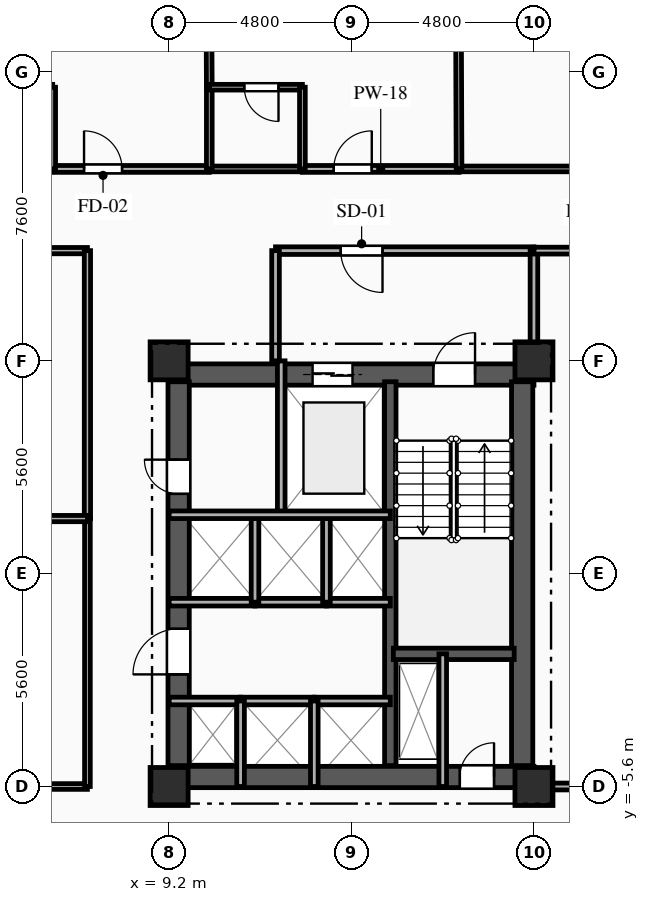
"""IFC4 building model, lengths in metres.
Left out: names, types, materials, properties, quantities, classifications, styles, units other than length and angle.
Written with IfcOpenShell. Run it as: python <this file> out.ifc"""

import sys

from ifc_helpers import new_model, si_unit, direction, frame, frame_2d, origin, origin_2d, place, context, subcontext, project, spatial, rectangle, extrude, element, fill, save


model = new_model("IFC4")
c1 = context("Model", 3, precision=1e-05, world=origin(), true_north=direction((0.0, 1.0)))
c2 = subcontext(c1, "Body", "Model", "MODEL_VIEW")
j1 = project(units=[si_unit("LENGTHUNIT", "METRE"), si_unit("PLANEANGLEUNIT", "RADIAN")], contexts=[c1])
p1 = place(None, origin())
s1 = spatial("IfcSite", under=j1, at=p1, CompositionType="ELEMENT")
p2 = place(p1, origin())
s2 = spatial("IfcBuilding", under=s1, at=p2, CompositionType="ELEMENT")
p3 = place(p2, frame((0.0, 0.0, 85.7)))
s3 = spatial("IfcBuildingStorey", under=s2, at=p3, CompositionType="ELEMENT", Elevation=85.7)
for number, where, z_axis, x_axis in (
    (1, (9.2, -5.6, 0.0), (0.0, 0.0, 1.0), (1.0, 0.0, 0.0)),
    (2, (9.2, 5.6, 0.0), (0.0, 0.0, 1.0), (1.0, 0.0, 0.0)),
    (3, (18.8, -5.6, 0.0), (0.0, 0.0, 1.0), (1.0, 0.0, 0.0)),
    (4, (18.8, 5.6, 0.0), (0.0, 0.0, 1.0), (1.0, 0.0, 0.0)),
):
    element("IfcColumn", number, at=place(p3, frame(where, z_axis=z_axis, x_axis=x_axis)), inside=s3, PredefinedType="COLUMN", context=c2, shape_type="SweptSolid", body=[
        extrude(rectangle(XDim=1.0, YDim=1.0, at=origin_2d()), origin(), (0.0, 0.0, 1.0), 3.35),
    ])
p4 = place(p3, frame((9.2, 5.24, 0.0), z_axis=(0.0, 0.0, 1.0), x_axis=(1.0, 0.0, 0.0)))
e5 = element("IfcWall", 5, at=p4, inside=s3, PredefinedType="SHEAR", context=c2, shape_type="SweptSolid", body=[
    extrude(rectangle(XDim=9.6, YDim=0.56, at=frame_2d((4.8, 0.0))), origin(), (0.0, 0.0, 1.0), 3.045),
])
p5 = place(p4, frame((6.95, 0.0, 0.0)))
e6 = element("IfcOpeningElement", 6, at=p5, cuts=e5, PredefinedType="OPENING", context=c2, shape_type="SweptSolid", body=[
    extrude(rectangle(XDim=1.1, YDim=2.15, at=frame_2d((0.55, 1.075))), frame((0.0, 0.29, 0.0), z_axis=(0.0, -1.0, 0.0), x_axis=(1.0, 0.0, 0.0)), (0.0, 0.0, 1.0), 0.58),
])
p6 = place(p4, frame((3.775, 0.0, 0.0)))
e7 = element("IfcOpeningElement", 7, at=p6, cuts=e5, PredefinedType="OPENING", context=c2, shape_type="SweptSolid", body=[
    extrude(rectangle(XDim=1.05, YDim=2.1, at=frame_2d((0.525, 1.05))), frame((0.0, 0.29, 0.0), z_axis=(0.0, -1.0, 0.0), x_axis=(1.0, 0.0, 0.0)), (0.0, 0.0, 1.0), 0.58),
])
p7 = place(p3, frame((9.2, -5.35, 0.0), z_axis=(0.0, 0.0, 1.0), x_axis=(1.0, 0.0, 0.0)))
e8 = element("IfcWall", 8, at=p7, inside=s3, PredefinedType="SHEAR", context=c2, shape_type="SweptSolid", body=[
    extrude(rectangle(XDim=9.6, YDim=0.56, at=frame_2d((4.8, 0.0))), origin(), (0.0, 0.0, 1.0), 3.045),
])
p8 = place(p7, frame((7.65, 0.0, 0.0)))
e9 = element("IfcOpeningElement", 9, at=p8, cuts=e8, PredefinedType="OPENING", context=c2, shape_type="SweptSolid", body=[
    extrude(rectangle(XDim=0.9, YDim=2.1, at=frame_2d((0.45, 1.05))), frame((0.0, 0.29, 0.0), z_axis=(0.0, -1.0, 0.0), x_axis=(1.0, 0.0, 0.0)), (0.0, 0.0, 1.0), 0.58),
])
p9 = place(p3, frame((9.45, -5.05, 0.0), z_axis=(0.0, 0.0, 1.0), x_axis=(0.0, 1.0, 0.0)))
e10 = element("IfcWall", 10, at=p9, inside=s3, PredefinedType="SHEAR", context=c2, shape_type="SweptSolid", body=[
    extrude(rectangle(XDim=10.1, YDim=0.56, at=frame_2d((5.05, 0.0))), origin(), (0.0, 0.0, 1.0), 3.045),
])
p10 = place(p9, frame((7.15, 0.0, 0.0)))
e11 = element("IfcOpeningElement", 11, at=p10, cuts=e10, PredefinedType="OPENING", context=c2, shape_type="SweptSolid", body=[
    extrude(rectangle(XDim=0.9, YDim=2.1, at=frame_2d((0.45, 1.05))), frame((0.0, 0.29, 0.0), z_axis=(0.0, -1.0, 0.0), x_axis=(1.0, 0.0, 0.0)), (0.0, 0.0, 1.0), 0.58),
])
p11 = place(p9, frame((2.4, 0.0, 0.0)))
e12 = element("IfcOpeningElement", 12, at=p11, cuts=e10, PredefinedType="OPENING", context=c2, shape_type="SweptSolid", body=[
    extrude(rectangle(XDim=1.2, YDim=2.15, at=frame_2d((0.6, 1.075))), frame((0.0, 0.29, 0.0), z_axis=(0.0, -1.0, 0.0), x_axis=(1.0, 0.0, 0.0)), (0.0, 0.0, 1.0), 0.58),
])
p12 = place(p3, frame((18.49, -5.05, 0.0), z_axis=(0.0, 0.0, 1.0), x_axis=(0.0, 1.0, 0.0)))
e13 = element("IfcWall", 13, at=p12, inside=s3, PredefinedType="SHEAR", context=c2, shape_type="SweptSolid", body=[
    extrude(rectangle(XDim=10.1, YDim=0.56, at=frame_2d((5.05, 0.0))), origin(), (0.0, 0.0, 1.0), 3.045),
])
p13 = place(p3, frame((15.02, -5.05, 0.0), z_axis=(0.0, 0.0, 1.0), x_axis=(0.0, 1.0, 0.0)))
e14 = element("IfcWall", 14, at=p13, inside=s3, PredefinedType="SHEAR", context=c2, shape_type="SweptSolid", body=[
    extrude(rectangle(XDim=10.1, YDim=0.3, at=frame_2d((5.05, 0.0))), origin(), (0.0, 0.0, 1.0), 3.045),
])
p14 = place(p3, frame((15.1, -2.11, 0.0), z_axis=(0.0, 0.0, 1.0), x_axis=(1.0, 0.0, 0.0)))
e15 = element("IfcWall", 15, at=p14, inside=s3, PredefinedType="SHEAR", context=c2, shape_type="SweptSolid", body=[
    extrude(rectangle(XDim=3.18, YDim=0.3, at=frame_2d((1.59, 0.0))), origin(), (0.0, 0.0, 1.0), 3.045),
])
p15 = place(p3, frame((16.4, -2.11, 0.0), z_axis=(0.0, 0.0, 1.0), x_axis=(0.0, -1.0, 0.0)))
e16 = element("IfcWall", 16, at=p15, inside=s3, PredefinedType="PARTITIONING", context=c2, shape_type="SweptSolid", body=[
    extrude(rectangle(XDim=3.49, YDim=0.2, at=frame_2d((1.745, 0.0))), origin(), (0.0, 0.0, 1.0), 3.045),
])
p16 = place(p3, frame((12.15, 5.6, 0.0), z_axis=(0.0, 0.0, 1.0), x_axis=(0.0, -1.0, 0.0)))
e17 = element("IfcWall", 17, at=p16, inside=s3, PredefinedType="PARTITIONING", context=c2, shape_type="SweptSolid", body=[
    extrude(rectangle(XDim=4.05, YDim=0.2, at=frame_2d((2.025, 0.0))), origin(), (0.0, 0.0, 1.0), 3.045),
])
p17 = place(p3, frame((18.8, 8.5, 0.0), z_axis=(0.0, 0.0, 1.0), x_axis=(-1.0, 0.0, 0.0)))
e18 = element("IfcWall", 18, at=p17, inside=s3, PredefinedType="PARTITIONING", context=c2, shape_type="SweptSolid", body=[
    extrude(rectangle(XDim=6.8, YDim=0.2, at=frame_2d((3.4, 0.0))), origin(), (0.0, 0.0, 1.0), 3.045),
])
p18 = place(p17, frame((3.985, 0.0, 0.0)))
e19 = element("IfcOpeningElement", 19, at=p18, cuts=e18, PredefinedType="OPENING", context=c2, shape_type="SweptSolid", body=[
    extrude(rectangle(XDim=1.1, YDim=2.15, at=frame_2d((0.55, 1.075))), frame((0.0, 0.11, 0.0), z_axis=(0.0, -1.0, 0.0), x_axis=(1.0, 0.0, 0.0)), (0.0, 0.0, 1.0), 0.22),
])
p19 = place(p3, frame((12.0, 8.5, 0.0), z_axis=(0.0, 0.0, 1.0), x_axis=(0.0, -1.0, 0.0)))
e20 = element("IfcWall", 20, at=p19, inside=s3, PredefinedType="PARTITIONING", context=c2, shape_type="SweptSolid", body=[
    extrude(rectangle(XDim=2.9, YDim=0.2, at=frame_2d((1.45, 0.0))), origin(), (0.0, 0.0, 1.0), 3.045),
])
p20 = place(p3, frame((18.8, 5.6, 0.0), z_axis=(0.0, 0.0, 1.0), x_axis=(0.0, 1.0, 0.0)))
e21 = element("IfcWall", 21, at=p20, inside=s3, PredefinedType="PARTITIONING", context=c2, shape_type="SweptSolid", body=[
    extrude(rectangle(XDim=2.9, YDim=0.2, at=frame_2d((1.45, 0.0))), origin(), (0.0, 0.0, 1.0), 2.53),
])
p21 = place(p3, frame((9.2, -3.35, 0.0), z_axis=(0.0, 0.0, 1.0), x_axis=(1.0, 0.0, 0.0)))
e22 = element("IfcWall", 22, at=p21, inside=s3, PredefinedType="PARTITIONING", context=c2, shape_type="SweptSolid", body=[
    extrude(rectangle(XDim=1.88, YDim=0.2, at=frame_2d((0.94, 0.0))), origin(), (0.0, 0.0, 1.0), 2.76),
])
p22 = place(p3, frame((11.08, -3.35, 0.0), z_axis=(0.0, 0.0, 1.0), x_axis=(1.0, 0.0, 0.0)))
e23 = element("IfcWall", 23, at=p22, inside=s3, PredefinedType="PARTITIONING", context=c2, shape_type="SweptSolid", body=[
    extrude(rectangle(XDim=1.94, YDim=0.2, at=frame_2d((0.97, 0.0))), origin(), (0.0, 0.0, 1.0), 3.045),
])
p23 = place(p3, frame((13.02, -3.35, 0.0), z_axis=(0.0, 0.0, 1.0), x_axis=(1.0, 0.0, 0.0)))
e24 = element("IfcWall", 24, at=p23, inside=s3, PredefinedType="PARTITIONING", context=c2, shape_type="SweptSolid", body=[
    extrude(rectangle(XDim=2.0, YDim=0.2, at=frame_2d((1.0, 0.0))), origin(), (0.0, 0.0, 1.0), 3.045),
])
p24 = place(p3, frame((11.46, -0.75, 0.0), z_axis=(0.0, 0.0, 1.0), x_axis=(-1.0, 0.0, 0.0)))
e25 = element("IfcWall", 25, at=p24, inside=s3, PredefinedType="PARTITIONING", context=c2, shape_type="SweptSolid", body=[
    extrude(rectangle(XDim=2.26, YDim=0.2, at=frame_2d((1.13, 0.0))), origin(), (0.0, 0.0, 1.0), 3.045),
])
p25 = place(p3, frame((13.34, -0.75, 0.0), z_axis=(0.0, 0.0, 1.0), x_axis=(-1.0, 0.0, 0.0)))
e26 = element("IfcWall", 26, at=p25, inside=s3, PredefinedType="PARTITIONING", context=c2, shape_type="SweptSolid", body=[
    extrude(rectangle(XDim=1.88, YDim=0.2, at=frame_2d((0.94, 0.0))), origin(), (0.0, 0.0, 1.0), 3.045),
])
p26 = place(p3, frame((15.02, -0.75, 0.0), z_axis=(0.0, 0.0, 1.0), x_axis=(-1.0, 0.0, 0.0)))
e27 = element("IfcWall", 27, at=p26, inside=s3, PredefinedType="PARTITIONING", context=c2, shape_type="SweptSolid", body=[
    extrude(rectangle(XDim=1.68, YDim=0.2, at=frame_2d((0.84, 0.0))), origin(), (0.0, 0.0, 1.0), 3.045),
])
for number, where, z_axis, x_axis in (
    (28, (11.08, -5.6, 0.0), (0.0, 0.0, 1.0), (0.0, 1.0, 0.0)),
    (29, (13.02, -5.6, 0.0), (0.0, 0.0, 1.0), (0.0, 1.0, 0.0)),
):
    element("IfcWall", number, at=place(p3, frame(where, z_axis=z_axis, x_axis=x_axis)), inside=s3, PredefinedType="PARTITIONING", context=c2, shape_type="SweptSolid", body=[
        extrude(rectangle(XDim=2.25, YDim=0.2, at=frame_2d((1.125, 0.0))), origin(), (0.0, 0.0, 1.0), 3.045),
    ])
for number, where, z_axis, x_axis in (
    (30, (11.46, -0.75, 0.0), (0.0, 0.0, 1.0), (0.0, 1.0, 0.0)),
    (31, (13.34, -0.75, 0.0), (0.0, 0.0, 1.0), (0.0, 1.0, 0.0)),
):
    element("IfcWall", number, at=place(p3, frame(where, z_axis=z_axis, x_axis=x_axis)), inside=s3, PredefinedType="PARTITIONING", context=c2, shape_type="SweptSolid", body=[
        extrude(rectangle(XDim=2.3, YDim=0.2, at=frame_2d((1.15, 0.0))), origin(), (0.0, 0.0, 1.0), 3.045),
    ])
p27 = place(p3, frame((21.45, 8.5, 0.0), z_axis=(0.0, 0.0, 1.0), x_axis=(-1.0, 0.0, 0.0)))
e32 = element("IfcWall", 32, at=p27, inside=s3, PredefinedType="PARTITIONING", context=c2, shape_type="SweptSolid", body=[
    extrude(rectangle(XDim=2.65, YDim=0.18, at=frame_2d((1.325, 0.0))), origin(), (0.0, 0.0, 1.0), 3.045),
])
p28 = place(p27, frame((0.641, 0.0, 0.0)))
e33 = element("IfcOpeningElement", 33, at=p28, cuts=e32, PredefinedType="OPENING", context=c2, shape_type="SweptSolid", body=[
    extrude(rectangle(XDim=1.0, YDim=2.15, at=frame_2d((0.5, 1.075))), frame((0.0, 0.1, 0.0), z_axis=(0.0, -1.0, 0.0), x_axis=(1.0, 0.0, 0.0)), (0.0, 0.0, 1.0), 0.2),
])
p29 = place(p3, frame((6.136, 10.65, 0.0), z_axis=(0.0, 0.0, 1.0), x_axis=(1.0, 0.0, 0.0)))
e34 = element("IfcWall", 34, at=p29, inside=s3, PredefinedType="PARTITIONING", context=c2, shape_type="SweptSolid", body=[
    extrude(rectangle(XDim=4.121, YDim=0.18, at=frame_2d((2.061, 0.0))), origin(), (0.0, 0.0, 1.0), 3.045),
])
p30 = place(p29, frame((0.825, 0.0, 0.0)))
e35 = element("IfcOpeningElement", 35, at=p30, cuts=e34, PredefinedType="OPENING", context=c2, shape_type="SweptSolid", body=[
    extrude(rectangle(XDim=1.0, YDim=2.15, at=frame_2d((0.5, 1.075))), frame((0.0, 0.1, 0.0), z_axis=(0.0, -1.0, 0.0), x_axis=(1.0, 0.0, 0.0)), (0.0, 0.0, 1.0), 0.2),
])
p31 = place(p3, frame((3.686, 10.65, 0.0), z_axis=(0.0, 0.0, 1.0), x_axis=(1.0, 0.0, 0.0)))
e36 = element("IfcWall", 36, at=p31, inside=s3, PredefinedType="PLUMBINGWALL", context=c2, shape_type="SweptSolid", body=[
    extrude(rectangle(XDim=2.45, YDim=0.15, at=frame_2d((1.225, 0.0))), origin(), (0.0, 0.0, 1.0), 3.045),
])
p32 = place(p3, frame((12.707, 10.65, 0.0), z_axis=(0.0, 0.0, 1.0), x_axis=(1.0, 0.0, 0.0)))
e37 = element("IfcWall", 37, at=p32, inside=s3, PredefinedType="PARTITIONING", context=c2, shape_type="SweptSolid", body=[
    extrude(rectangle(XDim=4.122, YDim=0.18, at=frame_2d((2.061, 0.0))), origin(), (0.0, 0.0, 1.0), 3.045),
])
p33 = place(p32, frame((0.825, 0.0, 0.0)))
e38 = element("IfcOpeningElement", 38, at=p33, cuts=e37, PredefinedType="OPENING", context=c2, shape_type="SweptSolid", body=[
    extrude(rectangle(XDim=1.0, YDim=2.15, at=frame_2d((0.5, 1.075))), frame((0.0, 0.1, 0.0), z_axis=(0.0, -1.0, 0.0), x_axis=(1.0, 0.0, 0.0)), (0.0, 0.0, 1.0), 0.2),
])
p34 = place(p3, frame((10.257, 10.65, 0.0), z_axis=(0.0, 0.0, 1.0), x_axis=(1.0, 0.0, 0.0)))
e39 = element("IfcWall", 39, at=p34, inside=s3, PredefinedType="PLUMBINGWALL", context=c2, shape_type="SweptSolid", body=[
    extrude(rectangle(XDim=2.45, YDim=0.15, at=frame_2d((1.225, 0.0))), origin(), (0.0, 0.0, 1.0), 3.045),
])
p35 = place(p3, frame((16.829, 10.65, 0.0), z_axis=(0.0, 0.0, 1.0), x_axis=(1.0, 0.0, 0.0)))
e40 = element("IfcWall", 40, at=p35, inside=s3, PredefinedType="PARTITIONING", context=c2, shape_type="SweptSolid", body=[
    extrude(rectangle(XDim=6.171, YDim=0.15, at=frame_2d((3.085, 0.0))), origin(), (0.0, 0.0, 1.0), 3.045),
])
p36 = place(p35, frame((4.046, 0.0, 0.0)))
e41 = element("IfcOpeningElement", 41, at=p36, cuts=e40, PredefinedType="OPENING", context=c2, shape_type="SweptSolid", body=[
    extrude(rectangle(XDim=1.05, YDim=2.15, at=frame_2d((0.525, 1.075))), frame((0.0, 0.085, 0.0), z_axis=(0.0, -1.0, 0.0), x_axis=(1.0, 0.0, 0.0)), (0.0, 0.0, 1.0), 0.17),
])
p37 = place(p3, frame((7.05, 8.5, 0.0), z_axis=(0.0, 0.0, 1.0), x_axis=(-1.0, 0.0, 0.0)))
e42 = element("IfcWall", 42, at=p37, inside=s3, PredefinedType="PARTITIONING", context=c2, shape_type="SweptSolid", body=[
    extrude(rectangle(XDim=7.05, YDim=0.165, at=frame_2d((3.525, 0.0))), origin(), (0.0, 0.0, 1.0), 3.045),
])
p38 = place(p37, frame((4.728, 0.0, 0.0)))
e43 = element("IfcOpeningElement", 43, at=p38, cuts=e42, PredefinedType="OPENING", context=c2, shape_type="SweptSolid", body=[
    extrude(rectangle(XDim=1.15, YDim=2.15, at=frame_2d((0.575, 1.075))), frame((0.0, 0.093, 0.0), z_axis=(0.0, -1.0, 0.0), x_axis=(1.0, 0.0, 0.0)), (0.0, 0.0, 1.0), 0.185),
])
p39 = place(p3, frame((18.8, -5.6, 0.0), z_axis=(0.0, 0.0, 1.0), x_axis=(1.0, 0.0, 0.0)))
e44 = element("IfcWall", 44, at=p39, inside=s3, PredefinedType="PARTITIONING", context=c2, shape_type="SweptSolid", body=[
    extrude(rectangle(XDim=2.65, YDim=0.18, at=frame_2d((1.325, 0.0))), origin(), (0.0, 0.0, 1.0), 2.53),
])
p40 = place(p3, frame((0.0, -5.6, 0.0), z_axis=(0.0, 0.0, 1.0), x_axis=(1.0, 0.0, 0.0)))
e45 = element("IfcWall", 45, at=p40, inside=s3, PredefinedType="PARTITIONING", context=c2, shape_type="SweptSolid", body=[
    extrude(rectangle(XDim=7.05, YDim=0.15, at=frame_2d((3.525, 0.0))), origin(), (0.0, 0.0, 1.0), 2.53),
])
p41 = place(p40, frame((1.185, 0.0, 0.0)))
e46 = element("IfcOpeningElement", 46, at=p41, cuts=e45, PredefinedType="OPENING", context=c2, shape_type="SweptSolid", body=[
    extrude(rectangle(XDim=1.05, YDim=2.15, at=frame_2d((0.525, 1.075))), frame((0.0, 0.085, 0.0), z_axis=(0.0, -1.0, 0.0), x_axis=(1.0, 0.0, 0.0)), (0.0, 0.0, 1.0), 0.17),
])
p42 = place(p3, frame((7.05, -5.6, 0.0), z_axis=(0.0, 0.0, 1.0), x_axis=(0.0, 1.0, 0.0)))
e47 = element("IfcWall", 47, at=p42, inside=s3, PredefinedType="PARTITIONING", context=c2, shape_type="SweptSolid", body=[
    extrude(rectangle(XDim=7.05, YDim=0.15, at=frame_2d((3.525, 0.0))), origin(), (0.0, 0.0, 1.0), 3.045),
])
p43 = place(p3, frame((7.05, 1.45, 0.0), z_axis=(0.0, 0.0, 1.0), x_axis=(0.0, 1.0, 0.0)))
e48 = element("IfcWall", 48, at=p43, inside=s3, PredefinedType="PARTITIONING", context=c2, shape_type="SweptSolid", body=[
    extrude(rectangle(XDim=7.05, YDim=0.165, at=frame_2d((3.525, 0.0))), origin(), (0.0, 0.0, 1.0), 3.045),
])
p44 = place(p3, frame((6.136, 12.8, 0.0), z_axis=(0.0, 0.0, 1.0), x_axis=(-1.0, 0.0, 0.0)))
e49 = element("IfcWall", 49, at=p44, inside=s3, PredefinedType="PLUMBINGWALL", context=c2, shape_type="SweptSolid", body=[
    extrude(rectangle(XDim=2.45, YDim=0.15, at=frame_2d((1.225, 0.0))), origin(), (0.0, 0.0, 1.0), 3.045),
])
p45 = place(p44, frame((0.921, 0.0, 0.0)))
e50 = element("IfcOpeningElement", 50, at=p45, cuts=e49, PredefinedType="OPENING", context=c2, shape_type="SweptSolid", body=[
    extrude(rectangle(XDim=0.9, YDim=2.1, at=frame_2d((0.45, 1.05))), frame((0.0, 0.085, 0.0), z_axis=(0.0, -1.0, 0.0), x_axis=(1.0, 0.0, 0.0)), (0.0, 0.0, 1.0), 0.17),
])
p46 = place(p3, frame((6.136, 10.65, 0.0), z_axis=(0.0, 0.0, 1.0), x_axis=(0.0, 1.0, 0.0)))
e51 = element("IfcWall", 51, at=p46, inside=s3, PredefinedType="PLUMBINGWALL", context=c2, shape_type="SweptSolid", body=[
    extrude(rectangle(XDim=2.15, YDim=0.15, at=frame_2d((1.075, 0.0))), origin(), (0.0, 0.0, 1.0), 3.045),
])
p47 = place(p3, frame((10.213, 21.508, 0.0), z_axis=(0.0, 0.0, 1.0), x_axis=(0.005046334579, -0.999987267173, 0.0)))
e52 = element("IfcWall", 52, at=p47, inside=s3, PredefinedType="PARTITIONING", context=c2, shape_type="SweptSolid", body=[
    extrude(rectangle(XDim=8.708, YDim=0.15, at=frame_2d((4.354, 0.0))), origin(), (0.0, 0.0, 1.0), 3.045),
])
p48 = place(p3, frame((10.257, 12.8, 0.0), z_axis=(0.0, 0.0, 1.0), x_axis=(0.0, -1.0, 0.0)))
e53 = element("IfcWall", 53, at=p48, inside=s3, PredefinedType="PLUMBINGWALL", context=c2, shape_type="SweptSolid", body=[
    extrude(rectangle(XDim=2.15, YDim=0.15, at=frame_2d((1.075, 0.0))), origin(), (0.0, 0.0, 1.0), 3.045),
])
p49 = place(p3, frame((12.707, 12.8, 0.0), z_axis=(0.0, 0.0, 1.0), x_axis=(-1.0, 0.0, 0.0)))
e54 = element("IfcWall", 54, at=p49, inside=s3, PredefinedType="PLUMBINGWALL", context=c2, shape_type="SweptSolid", body=[
    extrude(rectangle(XDim=2.45, YDim=0.15, at=frame_2d((1.225, 0.0))), origin(), (0.0, 0.0, 1.0), 3.045),
])
p50 = place(p49, frame((0.629, 0.0, 0.0)))
e55 = element("IfcOpeningElement", 55, at=p50, cuts=e54, PredefinedType="OPENING", context=c2, shape_type="SweptSolid", body=[
    extrude(rectangle(XDim=0.9, YDim=2.1, at=frame_2d((0.45, 1.05))), frame((0.0, 0.085, 0.0), z_axis=(0.0, -1.0, 0.0), x_axis=(1.0, 0.0, 0.0)), (0.0, 0.0, 1.0), 0.17),
])
p51 = place(p3, frame((12.707, 10.65, 0.0), z_axis=(0.0, 0.0, 1.0), x_axis=(0.0, 1.0, 0.0)))
e56 = element("IfcWall", 56, at=p51, inside=s3, PredefinedType="PLUMBINGWALL", context=c2, shape_type="SweptSolid", body=[
    extrude(rectangle(XDim=2.15, YDim=0.15, at=frame_2d((1.075, 0.0))), origin(), (0.0, 0.0, 1.0), 3.045),
])
p52 = place(p3, frame((16.785, 22.199, 0.0), z_axis=(0.0, 0.0, 1.0), x_axis=(0.003805067053, -0.999992760706, 0.0)))
e57 = element("IfcWall", 57, at=p52, inside=s3, PredefinedType="PARTITIONING", context=c2, shape_type="SweptSolid", body=[
    extrude(rectangle(XDim=11.549, YDim=0.15, at=frame_2d((5.774, 0.0))), origin(), (0.0, 0.0, 1.0), 3.045),
])
p53 = place(p3, frame((0.0, 1.45, 0.0), z_axis=(0.0, 0.0, 1.0), x_axis=(1.0, 0.0, 0.0)))
e58 = element("IfcWall", 58, at=p53, inside=s3, PredefinedType="PARTITIONING", context=c2, shape_type="SweptSolid", body=[
    extrude(rectangle(XDim=7.05, YDim=0.165, at=frame_2d((3.525, 0.0))), origin(), (0.0, 0.0, 1.0), 3.045),
])
p54 = place(p3, frame((9.2, 1.55, 0.0), z_axis=(0.0, 0.0, 1.0), x_axis=(1.0, 0.0, 0.0)))
e59 = element("IfcWall", 59, at=p54, inside=s3, PredefinedType="PARTITIONING", context=c2, shape_type="SweptSolid", body=[
    extrude(rectangle(XDim=5.82, YDim=0.2, at=frame_2d((2.91, 0.0))), origin(), (0.0, 0.0, 1.0), 3.045),
])
p55 = place(p5, origin())
e60 = element("IfcDoor", 60, at=p55, inside=s3, OperationType="SINGLE_SWING_RIGHT", PredefinedType="DOOR", context=c2, shape_type="SweptSolid", body=[
    extrude(rectangle(XDim=1.1, YDim=2.15, at=frame_2d((0.55, 1.075))), frame((0.0, 0.025, 0.0), z_axis=(0.0, -1.0, 0.0), x_axis=(1.0, 0.0, 0.0)), (0.0, 0.0, 1.0), 0.05),
])
fill(e6, e60)
p56 = place(p6, origin())
e61 = element("IfcDoor", 61, at=p56, inside=s3, OperationType="DOUBLE_DOOR_SLIDING", PredefinedType="DOOR", context=c2, shape_type="SweptSolid", body=[
    extrude(rectangle(XDim=1.05, YDim=2.1, at=frame_2d((0.525, 1.05))), frame((0.0, 0.025, 0.0), z_axis=(0.0, -1.0, 0.0), x_axis=(1.0, 0.0, 0.0)), (0.0, 0.0, 1.0), 0.05),
])
fill(e7, e61)
p57 = place(p8, origin())
e62 = element("IfcDoor", 62, at=p57, inside=s3, OperationType="SINGLE_SWING_RIGHT", PredefinedType="DOOR", context=c2, shape_type="SweptSolid", body=[
    extrude(rectangle(XDim=0.9, YDim=2.1, at=frame_2d((0.45, 1.05))), frame((0.0, 0.025, 0.0), z_axis=(0.0, -1.0, 0.0), x_axis=(1.0, 0.0, 0.0)), (0.0, 0.0, 1.0), 0.05),
])
fill(e9, e62)
p58 = place(p18, origin())
e63 = element("IfcDoor", 63, at=p58, inside=s3, OperationType="SINGLE_SWING_LEFT", PredefinedType="DOOR", context=c2, shape_type="SweptSolid", body=[
    extrude(rectangle(XDim=1.1, YDim=2.15, at=frame_2d((0.55, 1.075))), frame((0.0, 0.025, 0.0), z_axis=(0.0, -1.0, 0.0), x_axis=(1.0, 0.0, 0.0)), (0.0, 0.0, 1.0), 0.05),
])
fill(e19, e63)
p59 = place(p10, origin())
e64 = element("IfcDoor", 64, at=p59, inside=s3, OperationType="SINGLE_SWING_RIGHT", PredefinedType="DOOR", context=c2, shape_type="SweptSolid", body=[
    extrude(rectangle(XDim=0.9, YDim=2.1, at=frame_2d((0.45, 1.05))), frame((0.0, 0.025, 0.0), z_axis=(0.0, -1.0, 0.0), x_axis=(1.0, 0.0, 0.0)), (0.0, 0.0, 1.0), 0.05),
])
fill(e11, e64)
p60 = place(p11, origin())
e65 = element("IfcDoor", 65, at=p60, inside=s3, OperationType="SINGLE_SWING_LEFT", PredefinedType="DOOR", context=c2, shape_type="SweptSolid", body=[
    extrude(rectangle(XDim=1.2, YDim=2.15, at=frame_2d((0.6, 1.075))), frame((0.0, 0.025, 0.0), z_axis=(0.0, -1.0, 0.0), x_axis=(1.0, 0.0, 0.0)), (0.0, 0.0, 1.0), 0.05),
])
fill(e12, e65)
p61 = place(p30, origin())
e66 = element("IfcDoor", 66, at=p61, inside=s3, OperationType="SINGLE_SWING_LEFT", PredefinedType="DOOR", context=c2, shape_type="SweptSolid", body=[
    extrude(rectangle(XDim=1.0, YDim=2.15, at=frame_2d((0.5, 1.075))), frame((0.0, 0.025, 0.0), z_axis=(0.0, -1.0, 0.0), x_axis=(1.0, 0.0, 0.0)), (0.0, 0.0, 1.0), 0.05),
])
fill(e35, e66)
p62 = place(p33, origin())
e67 = element("IfcDoor", 67, at=p62, inside=s3, OperationType="SINGLE_SWING_RIGHT", PredefinedType="DOOR", context=c2, shape_type="SweptSolid", body=[
    extrude(rectangle(XDim=1.0, YDim=2.15, at=frame_2d((0.5, 1.075))), frame((0.0, 0.025, 0.0), z_axis=(0.0, -1.0, 0.0), x_axis=(1.0, 0.0, 0.0)), (0.0, 0.0, 1.0), 0.05),
])
fill(e38, e67)
p63 = place(p50, origin())
e68 = element("IfcDoor", 68, at=p63, inside=s3, OperationType="SINGLE_SWING_LEFT", PredefinedType="DOOR", context=c2, shape_type="SweptSolid", body=[
    extrude(rectangle(XDim=0.9, YDim=2.1, at=frame_2d((0.45, 1.05))), frame((0.0, 0.025, 0.0), z_axis=(0.0, -1.0, 0.0), x_axis=(1.0, 0.0, 0.0)), (0.0, 0.0, 1.0), 0.05),
])
fill(e55, e68)
save(model, sys.argv[1])
